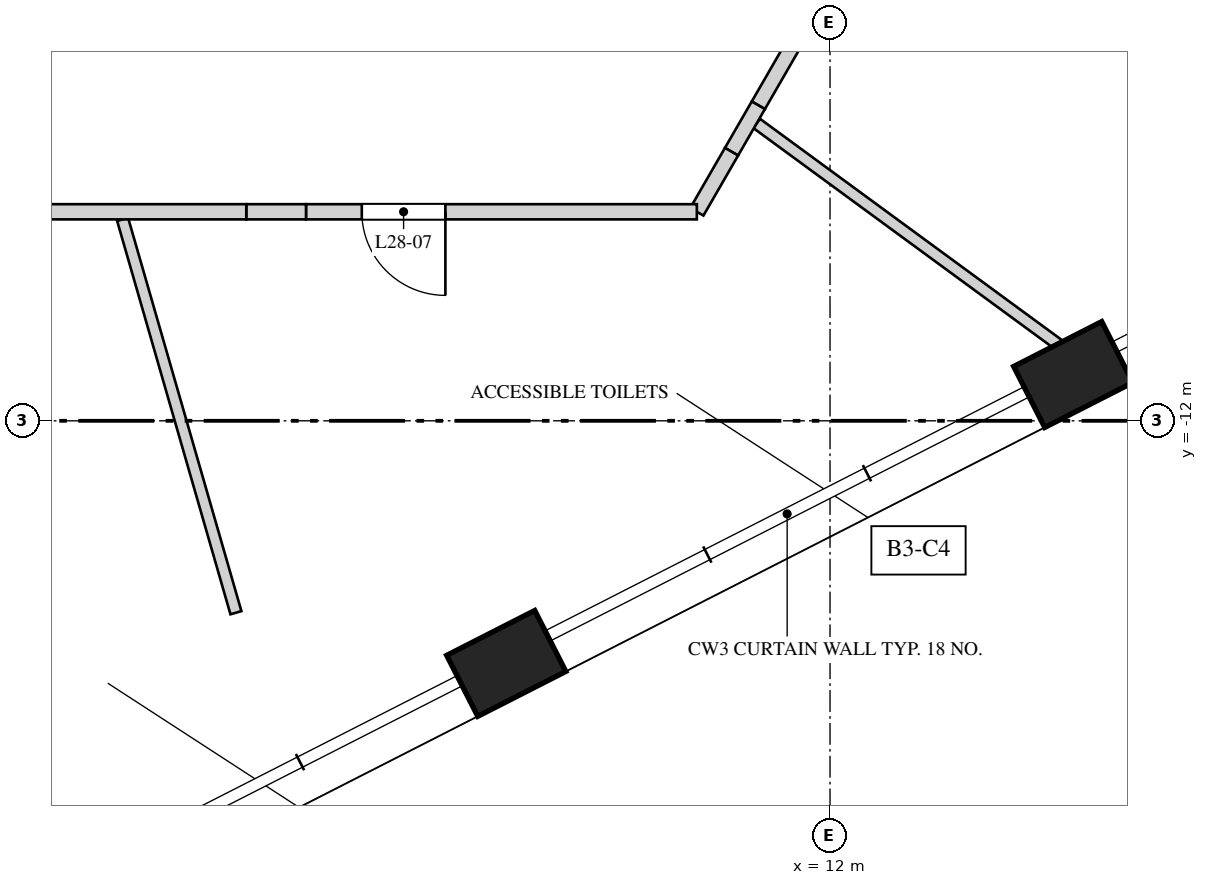
"""IFC4 building model, lengths in metres.
Left out: names, types, materials, properties, quantities, classifications, styles, units other than length and angle.
Written with IfcOpenShell. Run it as: python <this file> out.ifc"""

import sys

from ifc_helpers import new_model, si_unit, direction, frame, frame_2d, origin, origin_2d, place, context, subcontext, project, spatial, rectangle, extrude, element, fill, save


model = new_model("IFC4")
c1 = context("Model", 3, precision=1e-05, world=origin(), true_north=direction((0.0, 1.0)))
c2 = subcontext(c1, "Body", "Model", "MODEL_VIEW")
j1 = project(units=[si_unit("LENGTHUNIT", "METRE"), si_unit("PLANEANGLEUNIT", "RADIAN")], contexts=[c1])
p1 = place(None, origin())
s1 = spatial("IfcSite", under=j1, at=p1, CompositionType="ELEMENT")
p2 = place(p1, origin())
s2 = spatial("IfcBuilding", under=s1, at=p2, CompositionType="ELEMENT")
p3 = place(p2, frame((0.0, 0.0, 125.6)))
s3 = spatial("IfcBuildingStorey", under=s2, at=p3, CompositionType="ELEMENT", Elevation=125.6)
for number, where, z_axis, x_axis in (
    (1, (7.74, -15.192, -0.35), (0.0, 0.0, 1.0), (0.891, 0.454, 0.0)),
    (2, (15.2, -11.391, -0.35), (0.0, 0.0, 1.0), (0.891, 0.454, 0.0)),
):
    element("IfcColumn", number, at=place(p3, frame(where, z_axis=z_axis, x_axis=x_axis)), inside=s3, PredefinedType="COLUMN", context=c2, shape_type="SweptSolid", body=[
        extrude(rectangle(XDim=1.3, YDim=0.9, at=origin_2d()), origin(), (0.0, 0.0, 1.0), 4.35),
    ])
p4 = place(p3, frame((2.693, -9.35, 0.0), z_axis=(0.0, 0.0, 1.0), x_axis=(0.276828214385, -0.960919424156, 0.0)))
e3 = element("IfcWall", 3, at=p4, inside=s3, PredefinedType="PARTITIONING", context=c2, shape_type="SweptSolid", body=[
    extrude(rectangle(XDim=5.385, YDim=0.15, at=frame_2d((2.692, 0.0))), origin(), (0.0, 0.0, 1.0), 3.65),
])
p5 = place(p3, frame((11.035, -8.087, 0.0), z_axis=(0.0, 0.0, 1.0), x_axis=(0.806587239444, -0.591115069311, 0.0)))
e4 = element("IfcWall", 4, at=p5, inside=s3, PredefinedType="PARTITIONING", context=c2, shape_type="SweptSolid", body=[
    extrude(rectangle(XDim=5.28, YDim=0.15, at=frame_2d((2.64, 0.0))), origin(), (0.0, 0.0, 1.0), 2.95),
])
p6 = place(p3, frame((12.858, -4.729, 0.0), z_axis=(0.0, 0.0, 1.0), x_axis=(-0.500031425827, -0.866007259314, 0.0)))
e5 = element("IfcWall", 5, at=p6, inside=s3, PredefinedType="SOLIDWALL", context=c2, shape_type="SweptSolid", body=[
    extrude(rectangle(XDim=3.602, YDim=0.2, at=frame_2d((1.801, 0.0))), origin(), (0.0, 0.0, 1.0), 3.65),
])
p7 = place(p3, frame((11.057, -7.849, 0.0), z_axis=(0.0, 0.0, 1.0), x_axis=(-0.500012199891, -0.86601836006, 0.0)))
e6 = element("IfcWall", 6, at=p7, inside=s3, PredefinedType="SOLIDWALL", context=c2, shape_type="SweptSolid", body=[
    extrude(rectangle(XDim=0.705, YDim=0.2, at=frame_2d((0.353, 0.0))), origin(), (0.0, 0.0, 1.0), 2.95),
])
p8 = place(p3, frame((10.704, -8.459, 0.0), z_axis=(0.0, 0.0, 1.0), x_axis=(-0.499907684424, -0.866078695647, 0.0)))
e7 = element("IfcWall", 7, at=p8, inside=s3, PredefinedType="SOLIDWALL", context=c2, shape_type="SweptSolid", body=[
    extrude(rectangle(XDim=0.913, YDim=0.2, at=frame_2d((0.457, 0.0))), origin(), (0.0, 0.0, 1.0), 3.65),
])
p9 = place(p3, frame((10.248, -9.25, 0.0), z_axis=(0.0, 0.0, 1.0), x_axis=(-1.0, 0.0, 0.0)))
e8 = element("IfcWall", 8, at=p9, inside=s3, PredefinedType="SOLIDWALL", context=c2, shape_type="SweptSolid", body=[
    extrude(rectangle(XDim=5.142, YDim=0.2, at=frame_2d((2.571, 0.0))), origin(), (0.0, 0.0, 1.0), 3.65),
])
p10 = place(p9, frame((3.308, 0.0, 0.0)))
e9 = element("IfcOpeningElement", 9, at=p10, cuts=e8, PredefinedType="OPENING", context=c2, shape_type="SweptSolid", body=[
    extrude(rectangle(XDim=1.1, YDim=2.4, at=frame_2d((0.55, 1.2))), frame((0.0, 0.11, 0.0), z_axis=(0.0, -1.0, 0.0), x_axis=(1.0, 0.0, 0.0)), (0.0, 0.0, 1.0), 0.22),
])
p11 = place(p3, frame((5.106, -9.25, 0.0), z_axis=(0.0, 0.0, 1.0), x_axis=(-1.0, 0.0, 0.0)))
e10 = element("IfcWall", 10, at=p11, inside=s3, PredefinedType="SOLIDWALL", context=c2, shape_type="SweptSolid", body=[
    extrude(rectangle(XDim=0.786, YDim=0.2, at=frame_2d((0.393, 0.0))), origin(), (0.0, 0.0, 1.0), 2.95),
])
p12 = place(p3, frame((4.32, -9.25, 0.0), z_axis=(0.0, 0.0, 1.0), x_axis=(-1.0, 0.0, 0.0)))
e11 = element("IfcWall", 11, at=p12, inside=s3, PredefinedType="SOLIDWALL", context=c2, shape_type="SweptSolid", body=[
    extrude(rectangle(XDim=3.783, YDim=0.2, at=frame_2d((1.892, 0.0))), origin(), (0.0, 0.0, 1.0), 3.65),
])
p13 = place(p10, origin())
e12 = element("IfcDoor", 12, at=p13, inside=s3, OperationType="SINGLE_SWING_LEFT", PredefinedType="DOOR", context=c2, shape_type="SweptSolid", body=[
    extrude(rectangle(XDim=1.1, YDim=2.4, at=frame_2d((0.55, 1.2))), frame((0.0, 0.025, 0.0), z_axis=(0.0, -1.0, 0.0), x_axis=(1.0, 0.0, 0.0)), (0.0, 0.0, 1.0), 0.05),
])
fill(e9, e12)
save(model, sys.argv[1])
